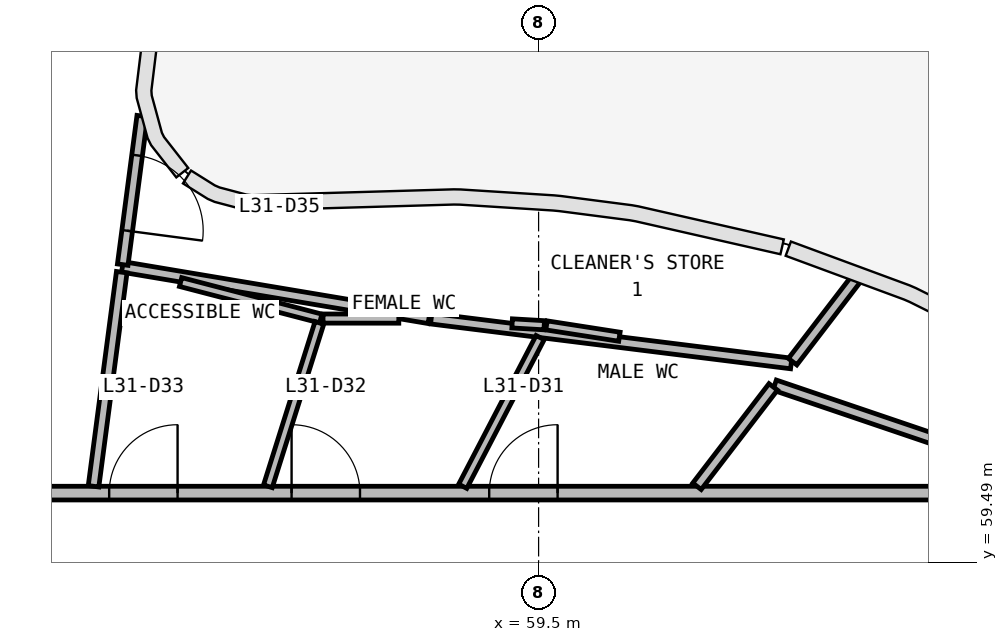
"""IFC4 building model, lengths in metres.
Left out: names, types, materials, properties, quantities, classifications, styles, units other than length and angle.
Written with IfcOpenShell. Run it as: python <this file> out.ifc"""

import sys

from ifc_helpers import new_model, si_unit, direction, frame, frame_2d, origin, place, context, subcontext, project, spatial, rectangle, extrude, source, transform, mapped, element, fill, save


model = new_model("IFC4")
c1 = context("Model", 3, precision=1e-05, world=origin(), true_north=direction((0.0, 1.0)))
c2 = subcontext(c1, "Body", "Model", "MODEL_VIEW")
j1 = project(units=[si_unit("LENGTHUNIT", "METRE"), si_unit("PLANEANGLEUNIT", "RADIAN")], contexts=[c1])
p1 = place(None, origin())
s1 = spatial("IfcSite", under=j1, at=p1, CompositionType="ELEMENT")
p2 = place(p1, origin())
s2 = spatial("IfcBuilding", under=s1, at=p2, CompositionType="ELEMENT")
p3 = place(p2, frame((0.0, 0.0, 133.1)))
s3 = spatial("IfcBuildingStorey", under=s2, at=p3, CompositionType="ELEMENT", Elevation=133.1)
p4 = place(p3, frame((36.6, 60.4, 0.0), z_axis=(0.0, 0.0, 1.0), x_axis=(1.0, 0.0, 0.0)))
e1 = element("IfcWall", 1, at=p4, inside=s3, PredefinedType="PARTITIONING", context=c2, shape_type="SweptSolid", body=[
    extrude(rectangle(XDim=30.8, YDim=0.18, at=frame_2d((15.4, 0.0))), origin(), (0.0, 0.0, 1.0), 2.88),
])
p5 = place(p4, frame((22.25, 0.0, 0.0)))
e2 = element("IfcOpeningElement", 2, at=p5, cuts=e1, PredefinedType="OPENING", context=c2, shape_type="SweptSolid", body=[
    extrude(rectangle(XDim=0.9, YDim=2.1, at=frame_2d((0.45, 1.05))), frame((0.0, 0.1, 0.0), z_axis=(0.0, -1.0, 0.0), x_axis=(1.0, 0.0, 0.0)), (0.0, 0.0, 1.0), 0.2),
])
p6 = place(p4, frame((19.65, 0.0, 0.0)))
e3 = element("IfcOpeningElement", 3, at=p6, cuts=e1, PredefinedType="OPENING", context=c2, shape_type="SweptSolid", body=[
    extrude(rectangle(XDim=0.9, YDim=2.1, at=frame_2d((0.45, 1.05))), frame((0.0, 0.1, 0.0), z_axis=(0.0, -1.0, 0.0), x_axis=(1.0, 0.0, 0.0)), (0.0, 0.0, 1.0), 0.2),
])
p7 = place(p4, frame((17.25, 0.0, 0.0)))
e4 = element("IfcOpeningElement", 4, at=p7, cuts=e1, PredefinedType="OPENING", context=c2, shape_type="SweptSolid", body=[
    extrude(rectangle(XDim=0.9, YDim=2.1, at=frame_2d((0.45, 1.05))), frame((0.0, 0.1, 0.0), z_axis=(0.0, -1.0, 0.0), x_axis=(1.0, 0.0, 0.0)), (0.0, 0.0, 1.0), 0.2),
])
p8 = place(p4, frame((14.95, 0.0, 0.0)))
e5 = element("IfcOpeningElement", 5, at=p8, cuts=e1, PredefinedType="OPENING", context=c2, shape_type="SweptSolid", body=[
    extrude(rectangle(XDim=1.0, YDim=2.1, at=frame_2d((0.5, 1.05))), frame((0.0, 0.1, 0.0), z_axis=(0.0, -1.0, 0.0), x_axis=(1.0, 0.0, 0.0)), (0.0, 0.0, 1.0), 0.2),
])
p9 = place(p4, frame((8.95, 0.0, 0.0)))
e6 = element("IfcOpeningElement", 6, at=p9, cuts=e1, PredefinedType="OPENING", context=c2, shape_type="SweptSolid", body=[
    extrude(rectangle(XDim=1.0, YDim=2.1, at=frame_2d((0.5, 1.05))), frame((0.0, 0.1, 0.0), z_axis=(0.0, -1.0, 0.0), x_axis=(1.0, 0.0, 0.0)), (0.0, 0.0, 1.0), 0.2),
])
p10 = place(p3, frame((62.823, 62.105, 0.0), z_axis=(0.0, 0.0, 1.0), x_axis=(-0.992341485201, 0.123524802163, 0.0)))
e7 = element("IfcWall", 7, at=p10, inside=s3, PredefinedType="PARTITIONING", context=c2, shape_type="SweptSolid", body=[
    extrude(rectangle(XDim=4.773, YDim=0.14, at=frame_2d((2.387, 0.0))), origin(), (0.0, 0.0, 1.0), 2.88),
])
p11 = place(p3, frame((66.527, 60.49, 0.0), z_axis=(0.0, 0.0, 1.0), x_axis=(-0.946923916586, 0.321457767362, 0.0)))
e8 = element("IfcWall", 8, at=p11, inside=s3, PredefinedType="PARTITIONING", context=c2, shape_type="SweptSolid", body=[
    extrude(rectangle(XDim=4.141, YDim=0.14, at=frame_2d((2.071, 0.0))), origin(), (0.0, 0.0, 1.0), 2.88),
])
p12 = place(p3, frame((58.057, 62.7, 0.0), z_axis=(0.0, 0.0, 1.0), x_axis=(-0.986230466663, 0.165376741489, 0.0)))
e9 = element("IfcWall", 9, at=p12, inside=s3, PredefinedType="PARTITIONING", context=c2, shape_type="SweptSolid", body=[
    extrude(rectangle(XDim=4.089, YDim=0.14, at=frame_2d((2.045, 0.0))), origin(), (0.0, 0.0, 1.0), 2.88),
])
p13 = place(p3, frame((53.644, 60.49, 0.0), z_axis=(0.0, 0.0, 1.0), x_axis=(0.13053676263, 0.991443469696, 0.0)))
e10 = element("IfcWall", 10, at=p13, inside=s3, PredefinedType="PARTITIONING", context=c2, shape_type="SweptSolid", body=[
    extrude(rectangle(XDim=2.841, YDim=0.14, at=frame_2d((1.42, 0.0))), origin(), (0.0, 0.0, 1.0), 2.88),
])
p14 = place(p3, frame((54.285, 65.36, 0.0), z_axis=(0.0, 0.0, 1.0), x_axis=(-0.130419269894, -0.9914589321, 0.0)))
e11 = element("IfcWall", 11, at=p14, inside=s3, PredefinedType="PARTITIONING", context=c2, shape_type="SweptSolid", body=[
    extrude(rectangle(XDim=1.971, YDim=0.14, at=frame_2d((0.986, 0.0))), origin(), (0.0, 0.0, 1.0), 2.88),
])
p15 = place(p14, frame((0.521, 0.0, 0.0)))
e12 = element("IfcOpeningElement", 12, at=p15, cuts=e11, PredefinedType="OPENING", context=c2, shape_type="SweptSolid", body=[
    extrude(rectangle(XDim=1.0, YDim=2.1, at=frame_2d((0.5, 1.05))), frame((0.0, 0.08, 0.0), z_axis=(0.0, -1.0, 0.0), x_axis=(1.0, 0.0, 0.0)), (0.0, 0.0, 1.0), 0.16),
])
p16 = place(p3, frame((61.584, 60.49, 0.0), z_axis=(0.0, 0.0, 1.0), x_axis=(0.608758070133, 0.793355917636, 0.0)))
e13 = element("IfcWall", 13, at=p16, inside=s3, PredefinedType="PARTITIONING", context=c2, shape_type="SweptSolid", body=[
    extrude(rectangle(XDim=1.648, YDim=0.14, at=frame_2d((0.824, 0.0))), origin(), (0.0, 0.0, 1.0), 2.88),
])
p17 = place(p3, frame((62.842, 62.129, 0.0), z_axis=(0.0, 0.0, 1.0), x_axis=(0.608734731497, 0.793373825299, 0.0)))
e14 = element("IfcWall", 14, at=p17, inside=s3, PredefinedType="PARTITIONING", context=c2, shape_type="SweptSolid", body=[
    extrude(rectangle(XDim=1.403, YDim=0.14, at=frame_2d((0.701, 0.0))), origin(), (0.0, 0.0, 1.0), 2.88),
])
p18 = place(p3, frame((60.563, 62.457, 0.0), z_axis=(0.0, 0.0, 1.0), x_axis=(-0.98809099795, 0.153870659223, 0.0)))
e15 = element("IfcWall", 15, at=p18, inside=s3, PredefinedType="PARTITIONING", context=c2, shape_type="SweptSolid", body=[
    extrude(rectangle(XDim=0.971, YDim=0.12, at=frame_2d((0.485, 0.0))), origin(), (0.0, 0.0, 1.0), 2.88),
])
p19 = place(p3, frame((56.634, 62.697, 0.0), z_axis=(0.0, 0.0, 1.0), x_axis=(-0.967721956085, 0.252020268452, 0.0)))
e16 = element("IfcWall", 16, at=p19, inside=s3, PredefinedType="PARTITIONING", context=c2, shape_type="SweptSolid", body=[
    extrude(rectangle(XDim=1.906, YDim=0.12, at=frame_2d((0.953, 0.0))), origin(), (0.0, 0.0, 1.0), 2.88),
])
p20 = place(p3, frame((55.938, 60.49, 0.0), z_axis=(0.0, 0.0, 1.0), x_axis=(0.300716585055, 0.95371355001, 0.0)))
e17 = element("IfcWall", 17, at=p20, inside=s3, PredefinedType="PARTITIONING", context=c2, shape_type="SweptSolid", body=[
    extrude(rectangle(XDim=2.254, YDim=0.12, at=frame_2d((1.127, 0.0))), origin(), (0.0, 0.0, 1.0), 2.88),
])
p21 = place(p3, frame((58.502, 60.49, 0.0), z_axis=(0.0, 0.0, 1.0), x_axis=(0.461767496619, 0.887001002855, 0.0)))
e18 = element("IfcWall", 18, at=p21, inside=s3, PredefinedType="PARTITIONING", context=c2, shape_type="SweptSolid", body=[
    extrude(rectangle(XDim=2.205, YDim=0.12, at=frame_2d((1.103, 0.0))), origin(), (0.0, 0.0, 1.0), 2.88),
])
p22 = place(p3, frame((59.574, 62.608, 0.0), z_axis=(0.0, 0.0, 1.0), x_axis=(-0.998298182331, 0.058315856805, 0.0)))
e19 = element("IfcWall", 19, at=p22, inside=s3, PredefinedType="PARTITIONING", context=c2, shape_type="SweptSolid", body=[
    extrude(rectangle(XDim=0.423, YDim=0.12, at=frame_2d((0.211, 0.0))), origin(), (0.0, 0.0, 1.0), 2.88),
])
p23 = place(p3, frame((57.661, 62.696, 0.0), z_axis=(0.0, 0.0, 1.0), x_axis=(-0.999999520122, 0.00097967134, 0.0)))
e20 = element("IfcWall", 20, at=p23, inside=s3, PredefinedType="PARTITIONING", context=c2, shape_type="SweptSolid", body=[
    extrude(rectangle(XDim=0.997, YDim=0.12, at=frame_2d((0.499, 0.0))), origin(), (0.0, 0.0, 1.0), 2.88),
])
m1 = source(origin(), c2, "Body", "SweptSolid", [
    extrude(rectangle(XDim=0.9, YDim=2.1, at=frame_2d((0.45, 1.05))), frame((0.0, 0.025, 0.0), z_axis=(0.0, -1.0, 0.0), x_axis=(1.0, 0.0, 0.0)), (0.0, 0.0, 1.0), 0.05),
])
p24 = place(p5, origin())
e21 = element("IfcDoor", 21, at=p24, inside=s3, OperationType="SINGLE_SWING_RIGHT", PredefinedType="DOOR", context=c2, shape_type="MappedRepresentation", body=[
    mapped(m1, transform((0.0, 0.0, 0.0), scale=1.0)),
])
fill(e2, e21)
p25 = place(p6, origin())
e22 = element("IfcDoor", 22, at=p25, inside=s3, OperationType="SINGLE_SWING_LEFT", PredefinedType="DOOR", context=c2, shape_type="MappedRepresentation", body=[
    mapped(m1, transform((0.0, 0.0, 0.0), scale=1.0)),
])
fill(e3, e22)
p26 = place(p7, origin())
e23 = element("IfcDoor", 23, at=p26, inside=s3, OperationType="SINGLE_SWING_RIGHT", PredefinedType="DOOR", context=c2, shape_type="MappedRepresentation", body=[
    mapped(m1, transform((0.0, 0.0, 0.0), scale=1.0)),
])
fill(e4, e23)
m2 = source(origin(), c2, "Body", "SweptSolid", [
    extrude(rectangle(XDim=1.0, YDim=2.1, at=frame_2d((0.5, 1.05))), frame((0.0, 0.025, 0.0), z_axis=(0.0, -1.0, 0.0), x_axis=(1.0, 0.0, 0.0)), (0.0, 0.0, 1.0), 0.05),
])
p27 = place(p15, origin())
e24 = element("IfcDoor", 24, at=p27, inside=s3, OperationType="SINGLE_SWING_RIGHT", PredefinedType="DOOR", context=c2, shape_type="MappedRepresentation", body=[
    mapped(m2, transform((0.0, 0.0, 0.0), scale=1.0)),
])
fill(e12, e24)
save(model, sys.argv[1])
